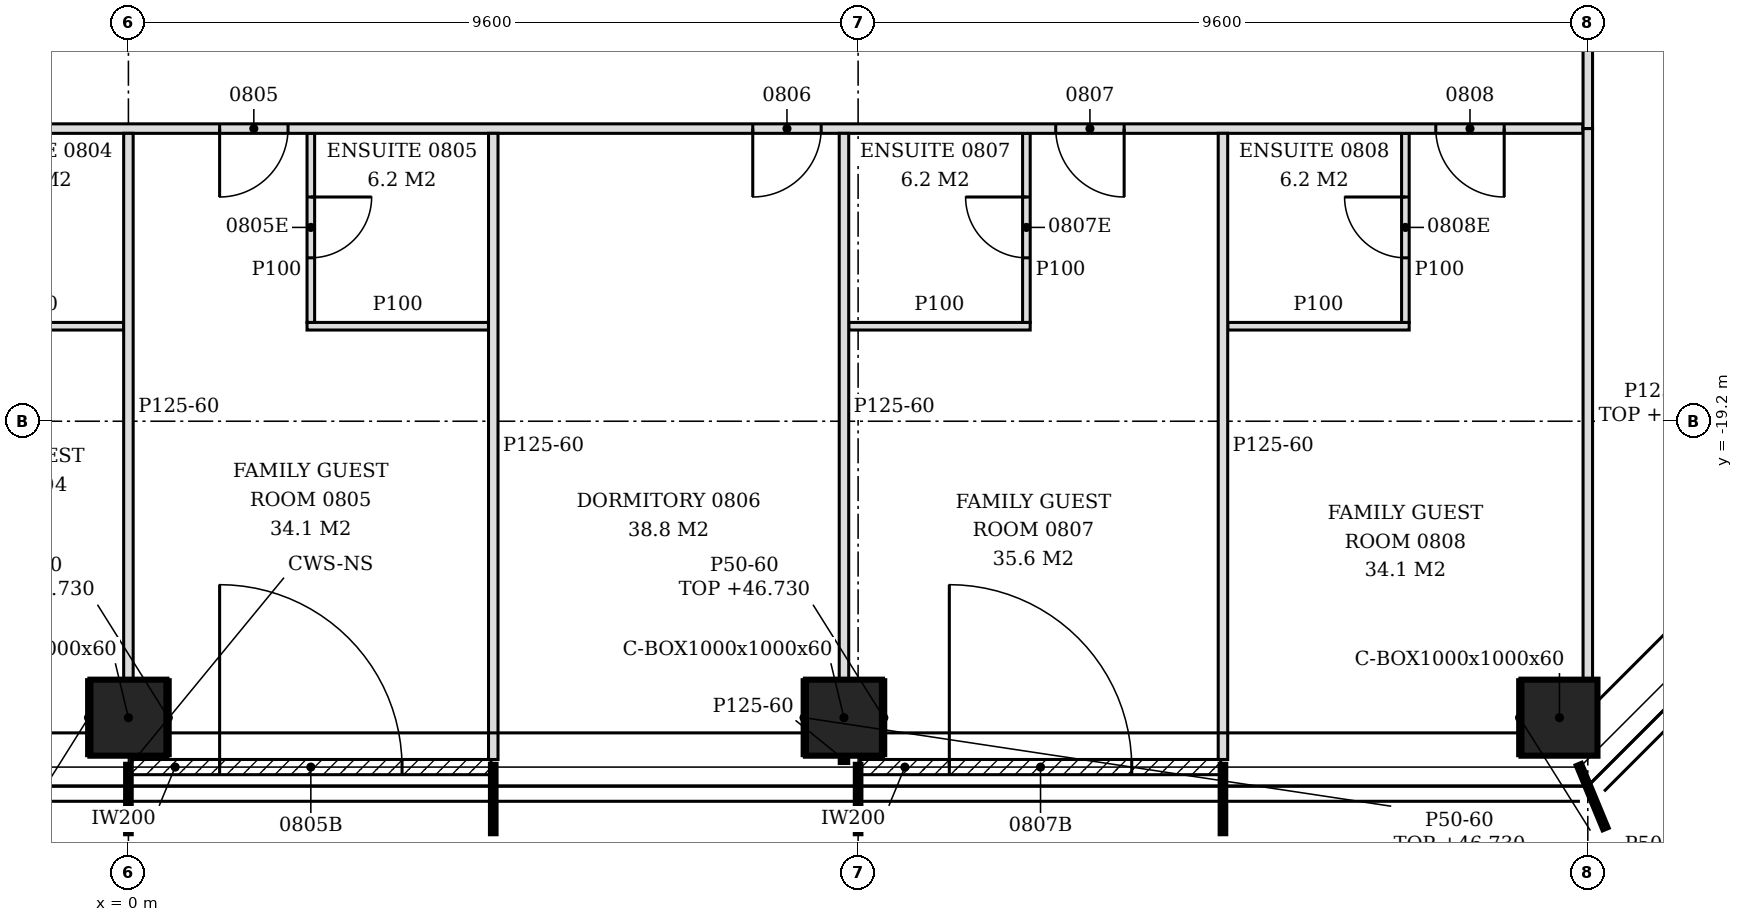
"""IFC4 building model, lengths in metres.
Left out: names, types, materials, properties, quantities, classifications, styles, units other than length and angle.
Written with IfcOpenShell. Run it as: python <this file> out.ifc"""

import sys

from ifc_helpers import new_model, si_unit, direction, frame, frame_2d, origin, origin_2d, place, context, subcontext, project, spatial, polyline, rectangle, hollow_rectangle, outline, extrude, element, fill, save


model = new_model("IFC4")
c1 = context("Model", 3, precision=1e-05, world=origin(), true_north=direction((0.0, 1.0)))
c2 = subcontext(c1, "Body", "Model", "MODEL_VIEW")
j1 = project(units=[si_unit("LENGTHUNIT", "METRE"), si_unit("PLANEANGLEUNIT", "RADIAN")], contexts=[c1])
p1 = place(None, origin())
s1 = spatial("IfcSite", under=j1, at=p1, CompositionType="ELEMENT")
p2 = place(p1, origin())
s2 = spatial("IfcBuilding", under=s1, at=p2, CompositionType="ELEMENT")
p3 = place(p2, frame((0.0, 0.0, 43.8)))
s3 = spatial("IfcBuildingStorey", under=s2, at=p3, CompositionType="ELEMENT", Elevation=43.8)
for number, where, z_axis, x_axis in (
    (1, (0.0, -23.1, -0.15), (0.0, 0.0, 1.0), (1.0, 0.0, 0.0)),
    (2, (9.414, -23.1, -0.15), (0.0, 0.0, 1.0), (1.0, 0.0, 0.0)),
    (3, (18.827, -23.1, -0.15), (0.0, 0.0, 1.0), (1.0, 0.0, 0.0)),
):
    element("IfcColumn", number, at=place(p3, frame(where, z_axis=z_axis, x_axis=x_axis)), inside=s3, PredefinedType="COLUMN", context=c2, shape_type="SweptSolid", body=[
        extrude(hollow_rectangle(XDim=1.0, YDim=1.0, WallThickness=0.06, at=origin_2d()), origin(), (0.0, 0.0, 1.0), 3.6),
    ])
p4 = place(p3, frame((0.03, -23.75, 0.0), z_axis=(0.0, 0.0, 1.0), x_axis=(1.0, 0.0, 0.0)))
e4 = element("IfcWall", 4, at=p4, inside=s3, PredefinedType="NOTDEFINED", context=c2, shape_type="SweptSolid", body=[
    extrude(rectangle(XDim=4.74, YDim=0.2, at=frame_2d((2.37, 0.0))), origin(), (0.0, 0.0, 1.0), 3.45),
])
p5 = place(p4, frame((1.17, 0.0, 0.0)))
e5 = element("IfcOpeningElement", 5, at=p5, cuts=e4, PredefinedType="OPENING", context=c2, shape_type="SweptSolid", body=[
    extrude(rectangle(XDim=2.4, YDim=2.4, at=frame_2d((1.2, 1.2))), frame((0.0, 0.11, 0.0), z_axis=(0.0, -1.0, 0.0), x_axis=(1.0, 0.0, 0.0)), (0.0, 0.0, 1.0), 0.22),
])
p6 = place(p3, frame((9.63, -23.75, 0.0), z_axis=(0.0, 0.0, 1.0), x_axis=(1.0, 0.0, 0.0)))
e6 = element("IfcWall", 6, at=p6, inside=s3, PredefinedType="NOTDEFINED", context=c2, shape_type="SweptSolid", body=[
    extrude(rectangle(XDim=4.74, YDim=0.2, at=frame_2d((2.37, 0.0))), origin(), (0.0, 0.0, 1.0), 3.45),
])
p7 = place(p6, frame((1.17, 0.0, 0.0)))
e7 = element("IfcOpeningElement", 7, at=p7, cuts=e6, PredefinedType="OPENING", context=c2, shape_type="SweptSolid", body=[
    extrude(rectangle(XDim=2.4, YDim=2.4, at=frame_2d((1.2, 1.2))), frame((0.0, 0.11, 0.0), z_axis=(0.0, -1.0, 0.0), x_axis=(1.0, 0.0, 0.0)), (0.0, 0.0, 1.0), 0.22),
])
p8 = place(p3, frame((4.8, -23.65, 0.0), z_axis=(0.0, 0.0, 1.0), x_axis=(0.0, 1.0, 0.0)))
e8 = element("IfcWall", 8, at=p8, inside=s3, PredefinedType="PARTITIONING", context=c2, shape_type="SweptSolid", body=[
    extrude(outline(polyline([(0.0, 0.0), (8.237, 0.0), (8.238, 3.45), (4.555, 3.45), (4.553, 2.88), (4.345, 2.88), (4.343, 3.45), (0.7, 3.45), (0.698, 2.93), (0.4, 2.93), (0.398, 3.45), (0.0, 3.45), (0.0, 0.0)])), frame((0.0, 0.062, 0.0), z_axis=(0.0, -1.0, 0.0), x_axis=(1.0, 0.0, 0.0)), (0.0, 0.0, 1.0), 0.125),
])
p9 = place(p3, frame((9.414, -23.703, 0.0), z_axis=(0.0, 0.0, 1.0), x_axis=(0.0, 1.0, 0.0)))
e9 = element("IfcWall", 9, at=p9, inside=s3, PredefinedType="PARTITIONING", context=c2, shape_type="SweptSolid", body=[
    extrude(rectangle(XDim=0.103, YDim=0.125, at=frame_2d((0.051, 0.0))), origin(), (0.0, 0.0, 1.0), 3.45),
])
p10 = place(p3, frame((14.4, -23.65, 0.0), z_axis=(0.0, 0.0, 1.0), x_axis=(0.0, 1.0, 0.0)))
e10 = element("IfcWall", 10, at=p10, inside=s3, PredefinedType="PARTITIONING", context=c2, shape_type="SweptSolid", body=[
    extrude(outline(polyline([(0.0, 0.0), (8.237, 0.0), (8.238, 3.45), (4.555, 3.45), (4.553, 2.88), (4.345, 2.88), (4.343, 3.45), (0.7, 3.45), (0.698, 2.93), (0.4, 2.93), (0.398, 3.45), (0.0, 3.45), (0.0, 0.0)])), frame((0.0, 0.062, 0.0), z_axis=(0.0, -1.0, 0.0), x_axis=(1.0, 0.0, 0.0)), (0.0, 0.0, 1.0), 0.125),
])
for number, where, z_axis, x_axis in (
    (11, (0.0, -22.6, 0.0), (0.0, 0.0, 1.0), (0.0, 1.0, 0.0)),
    (12, (9.414, -22.6, 0.0), (0.0, 0.0, 1.0), (0.0, 1.0, 0.0)),
):
    element("IfcWall", number, at=place(p3, frame(where, z_axis=z_axis, x_axis=x_axis)), inside=s3, PredefinedType="PARTITIONING", context=c2, shape_type="SweptSolid", body=[
        extrude(outline(polyline([(0.0, 0.0), (7.188, 0.0), (7.188, 3.45), (3.505, 3.45), (3.503, 2.88), (3.295, 2.88), (3.293, 3.45), (0.0, 3.45), (0.0, 0.0)])), frame((0.0, 0.062, 0.0), z_axis=(0.0, -1.0, 0.0), x_axis=(1.0, 0.0, 0.0)), (0.0, 0.0, 1.0), 0.125),
    ])
p11 = place(p3, frame((19.2, -22.6, 0.0), z_axis=(0.0, 0.0, 1.0), x_axis=(0.0, 1.0, 0.0)))
e13 = element("IfcWall", 13, at=p11, inside=s3, PredefinedType="PARTITIONING", context=c2, shape_type="SweptSolid", body=[
    extrude(outline(polyline([(0.0, 0.0), (7.25, 0.0), (7.25, 2.73), (0.43, 2.73), (0.428, 2.63), (0.0, 2.63), (0.0, 0.0)])), frame((0.0, 0.062, 0.0), z_axis=(0.0, -1.0, 0.0), x_axis=(1.0, 0.0, 0.0)), (0.0, 0.0, 1.0), 0.125),
])
for number, where, z_axis, x_axis in (
    (14, (-2.45, -17.95, 0.0), (0.0, 0.0, 1.0), (1.0, 0.0, 0.0)),
    (15, (2.35, -17.95, 0.0), (0.0, 0.0, 1.0), (1.0, 0.0, 0.0)),
):
    element("IfcWall", number, at=place(p3, frame(where, z_axis=z_axis, x_axis=x_axis)), inside=s3, PredefinedType="PARTITIONING", context=c2, shape_type="SweptSolid", body=[
        extrude(rectangle(XDim=2.387, YDim=0.1, at=frame_2d((1.194, 0.0))), origin(), (0.0, 0.0, 1.0), 3.45),
    ])
p12 = place(p3, frame((2.4, -17.9, 0.0), z_axis=(0.0, 0.0, 1.0), x_axis=(0.0, 1.0, 0.0)))
e16 = element("IfcWall", 16, at=p12, inside=s3, PredefinedType="PARTITIONING", context=c2, shape_type="SweptSolid", body=[
    extrude(rectangle(XDim=2.487, YDim=0.1, at=frame_2d((1.244, 0.0))), origin(), (0.0, 0.0, 1.0), 3.45),
])
p13 = place(p12, frame((0.85, 0.0, 0.0)))
e17 = element("IfcOpeningElement", 17, at=p13, cuts=e16, PredefinedType="OPENING", context=c2, shape_type="SweptSolid", body=[
    extrude(rectangle(XDim=0.8, YDim=2.1, at=frame_2d((0.4, 1.05))), frame((0.0, 0.06, 0.0), z_axis=(0.0, -1.0, 0.0), x_axis=(1.0, 0.0, 0.0)), (0.0, 0.0, 1.0), 0.12),
])
p14 = place(p3, frame((9.477, -17.95, 0.0), z_axis=(0.0, 0.0, 1.0), x_axis=(1.0, 0.0, 0.0)))
e18 = element("IfcWall", 18, at=p14, inside=s3, PredefinedType="PARTITIONING", context=c2, shape_type="SweptSolid", body=[
    extrude(rectangle(XDim=2.387, YDim=0.1, at=frame_2d((1.194, 0.0))), origin(), (0.0, 0.0, 1.0), 3.45),
])
p15 = place(p3, frame((11.814, -17.9, 0.0), z_axis=(0.0, 0.0, 1.0), x_axis=(0.0, 1.0, 0.0)))
e19 = element("IfcWall", 19, at=p15, inside=s3, PredefinedType="PARTITIONING", context=c2, shape_type="SweptSolid", body=[
    extrude(rectangle(XDim=2.487, YDim=0.1, at=frame_2d((1.244, 0.0))), origin(), (0.0, 0.0, 1.0), 3.45),
])
p16 = place(p15, frame((0.85, 0.0, 0.0)))
e20 = element("IfcOpeningElement", 20, at=p16, cuts=e19, PredefinedType="OPENING", context=c2, shape_type="SweptSolid", body=[
    extrude(rectangle(XDim=0.8, YDim=2.1, at=frame_2d((0.4, 1.05))), frame((0.0, 0.06, 0.0), z_axis=(0.0, -1.0, 0.0), x_axis=(1.0, 0.0, 0.0)), (0.0, 0.0, 1.0), 0.12),
])
p17 = place(p3, frame((14.462, -17.95, 0.0), z_axis=(0.0, 0.0, 1.0), x_axis=(1.0, 0.0, 0.0)))
e21 = element("IfcWall", 21, at=p17, inside=s3, PredefinedType="PARTITIONING", context=c2, shape_type="SweptSolid", body=[
    extrude(rectangle(XDim=2.388, YDim=0.1, at=frame_2d((1.194, 0.0))), origin(), (0.0, 0.0, 1.0), 3.45),
])
p18 = place(p3, frame((16.8, -17.9, 0.0), z_axis=(0.0, 0.0, 1.0), x_axis=(0.0, 1.0, 0.0)))
e22 = element("IfcWall", 22, at=p18, inside=s3, PredefinedType="PARTITIONING", context=c2, shape_type="SweptSolid", body=[
    extrude(rectangle(XDim=2.487, YDim=0.1, at=frame_2d((1.244, 0.0))), origin(), (0.0, 0.0, 1.0), 3.45),
])
p19 = place(p18, frame((0.85, 0.0, 0.0)))
e23 = element("IfcOpeningElement", 23, at=p19, cuts=e22, PredefinedType="OPENING", context=c2, shape_type="SweptSolid", body=[
    extrude(rectangle(XDim=0.8, YDim=2.1, at=frame_2d((0.4, 1.05))), frame((0.0, 0.06, 0.0), z_axis=(0.0, -1.0, 0.0), x_axis=(1.0, 0.0, 0.0)), (0.0, 0.0, 1.0), 0.12),
])
p20 = place(p3, frame((-20.15, -15.35, 0.0), z_axis=(0.0, 0.0, 1.0), x_axis=(1.0, 0.0, 0.0)))
e24 = element("IfcWall", 24, at=p20, inside=s3, PredefinedType="PARTITIONING", context=c2, shape_type="SweptSolid", body=[
    extrude(outline(polyline([(0.0, 0.0), (39.287, 0.0), (39.288, 2.73), (39.2, 2.73), (39.198, 3.45), (27.5, 3.45), (27.498, 2.73), (27.2, 2.73), (27.198, 3.45), (15.5, 3.45), (15.498, 2.73), (15.2, 2.73), (15.198, 3.45), (5.9, 3.45), (5.898, 2.93), (5.6, 2.93), (5.598, 3.45), (0.0, 3.45), (0.0, 0.0)])), frame((0.0, 0.062, 0.0), z_axis=(0.0, -1.0, 0.0), x_axis=(1.0, 0.0, 0.0)), (0.0, 0.0, 1.0), 0.125),
])
p21 = place(p20, frame((4.55, 0.0, 0.0)))
e25 = element("IfcOpeningElement", 25, at=p21, cuts=e24, PredefinedType="OPENING", context=c2, shape_type="SweptSolid", body=[
    extrude(rectangle(XDim=0.9, YDim=2.1, at=frame_2d((0.45, 1.05))), frame((0.0, 0.073, 0.0), z_axis=(0.0, -1.0, 0.0), x_axis=(1.0, 0.0, 0.0)), (0.0, 0.0, 1.0), 0.145),
])
p22 = place(p20, frame((7.136, 0.0, 0.0)))
e26 = element("IfcOpeningElement", 26, at=p22, cuts=e24, PredefinedType="OPENING", context=c2, shape_type="SweptSolid", body=[
    extrude(rectangle(XDim=0.9, YDim=2.1, at=frame_2d((0.45, 1.05))), frame((0.0, 0.073, 0.0), z_axis=(0.0, -1.0, 0.0), x_axis=(1.0, 0.0, 0.0)), (0.0, 0.0, 1.0), 0.145),
])
p23 = place(p20, frame((14.15, 0.0, 0.0)))
e27 = element("IfcOpeningElement", 27, at=p23, cuts=e24, PredefinedType="OPENING", context=c2, shape_type="SweptSolid", body=[
    extrude(rectangle(XDim=0.9, YDim=2.1, at=frame_2d((0.45, 1.05))), frame((0.0, 0.073, 0.0), z_axis=(0.0, -1.0, 0.0), x_axis=(1.0, 0.0, 0.0)), (0.0, 0.0, 1.0), 0.145),
])
p24 = place(p20, frame((16.55, 0.0, 0.0)))
e28 = element("IfcOpeningElement", 28, at=p24, cuts=e24, PredefinedType="OPENING", context=c2, shape_type="SweptSolid", body=[
    extrude(rectangle(XDim=0.9, YDim=2.1, at=frame_2d((0.45, 1.05))), frame((0.0, 0.073, 0.0), z_axis=(0.0, -1.0, 0.0), x_axis=(1.0, 0.0, 0.0)), (0.0, 0.0, 1.0), 0.145),
])
p25 = place(p20, frame((21.35, 0.0, 0.0)))
e29 = element("IfcOpeningElement", 29, at=p25, cuts=e24, PredefinedType="OPENING", context=c2, shape_type="SweptSolid", body=[
    extrude(rectangle(XDim=0.9, YDim=2.1, at=frame_2d((0.45, 1.05))), frame((0.0, 0.073, 0.0), z_axis=(0.0, -1.0, 0.0), x_axis=(1.0, 0.0, 0.0)), (0.0, 0.0, 1.0), 0.145),
])
p26 = place(p20, frame((28.364, 0.0, 0.0)))
e30 = element("IfcOpeningElement", 30, at=p26, cuts=e24, PredefinedType="OPENING", context=c2, shape_type="SweptSolid", body=[
    extrude(rectangle(XDim=0.9, YDim=2.1, at=frame_2d((0.45, 1.05))), frame((0.0, 0.073, 0.0), z_axis=(0.0, -1.0, 0.0), x_axis=(1.0, 0.0, 0.0)), (0.0, 0.0, 1.0), 0.145),
])
p27 = place(p20, frame((32.35, 0.0, 0.0)))
e31 = element("IfcOpeningElement", 31, at=p27, cuts=e24, PredefinedType="OPENING", context=c2, shape_type="SweptSolid", body=[
    extrude(rectangle(XDim=0.9, YDim=2.1, at=frame_2d((0.45, 1.05))), frame((0.0, 0.073, 0.0), z_axis=(0.0, -1.0, 0.0), x_axis=(1.0, 0.0, 0.0)), (0.0, 0.0, 1.0), 0.145),
])
p28 = place(p20, frame((37.35, 0.0, 0.0)))
e32 = element("IfcOpeningElement", 32, at=p28, cuts=e24, PredefinedType="OPENING", context=c2, shape_type="SweptSolid", body=[
    extrude(rectangle(XDim=0.9, YDim=2.1, at=frame_2d((0.45, 1.05))), frame((0.0, 0.073, 0.0), z_axis=(0.0, -1.0, 0.0), x_axis=(1.0, 0.0, 0.0)), (0.0, 0.0, 1.0), 0.145),
])
p29 = place(p3, frame((19.2, -15.35, 0.0), z_axis=(0.0, 0.0, 1.0), x_axis=(0.0, 1.0, 0.0)))
e33 = element("IfcWall", 33, at=p29, inside=s3, PredefinedType="PARTITIONING", context=c2, shape_type="SweptSolid", body=[
    extrude(rectangle(XDim=6.713, YDim=0.125, at=frame_2d((3.356, 0.0))), origin(), (0.0, 0.0, 1.0), 2.73),
])
p30 = place(p29, frame((4.55, 0.0, 0.0)))
e34 = element("IfcOpeningElement", 34, at=p30, cuts=e33, PredefinedType="OPENING", context=c2, shape_type="SweptSolid", body=[
    extrude(rectangle(XDim=0.9, YDim=2.1, at=frame_2d((0.45, 1.05))), frame((0.0, 0.073, 0.0), z_axis=(0.0, -1.0, 0.0), x_axis=(1.0, 0.0, 0.0)), (0.0, 0.0, 1.0), 0.145),
])
for number, where, z_axis, x_axis in (
    (35, (-0.525, -23.6, 0.0), (0.0, 0.0, 1.0), (0.0, 1.0, 0.0)),
    (36, (0.525, -23.6, 0.0), (0.0, 0.0, 1.0), (0.0, 1.0, 0.0)),
    (37, (8.889, -23.6, 0.0), (0.0, 0.0, 1.0), (0.0, 1.0, 0.0)),
    (38, (9.939, -23.6, 0.0), (0.0, 0.0, 1.0), (0.0, 1.0, 0.0)),
    (39, (18.302, -23.6, 0.0), (0.0, 0.0, 1.0), (0.0, 1.0, 0.0)),
):
    element("IfcWall", number, at=place(p3, frame(where, z_axis=z_axis, x_axis=x_axis)), inside=s3, PredefinedType="PARTITIONING", context=c2, shape_type="SweptSolid", body=[
        extrude(rectangle(XDim=1.0, YDim=0.05, at=frame_2d((0.5, 0.0))), origin(), (0.0, 0.0, 1.0), 2.93),
    ])
p31 = place(p5, origin())
e40 = element("IfcDoor", 40, at=p31, inside=s3, OperationType="SINGLE_SWING_LEFT", PredefinedType="DOOR", context=c2, shape_type="SweptSolid", body=[
    extrude(rectangle(XDim=2.4, YDim=2.4, at=frame_2d((1.2, 1.2))), frame((0.0, 0.025, 0.0), z_axis=(0.0, -1.0, 0.0), x_axis=(1.0, 0.0, 0.0)), (0.0, 0.0, 1.0), 0.05),
])
fill(e5, e40)
p32 = place(p7, origin())
e41 = element("IfcDoor", 41, at=p32, inside=s3, OperationType="SINGLE_SWING_LEFT", PredefinedType="DOOR", context=c2, shape_type="SweptSolid", body=[
    extrude(rectangle(XDim=2.4, YDim=2.4, at=frame_2d((1.2, 1.2))), frame((0.0, 0.025, 0.0), z_axis=(0.0, -1.0, 0.0), x_axis=(1.0, 0.0, 0.0)), (0.0, 0.0, 1.0), 0.05),
])
fill(e7, e41)
p33 = place(p25, frame((0.9, 0.0, 0.0), z_axis=(0.0, 0.0, 1.0), x_axis=(-1.0, 0.0, 0.0)))
e42 = element("IfcDoor", 42, at=p33, inside=s3, OperationType="SINGLE_SWING_RIGHT", PredefinedType="DOOR", context=c2, shape_type="SweptSolid", body=[
    extrude(rectangle(XDim=0.9, YDim=2.1, at=frame_2d((0.45, 1.05))), frame((0.0, 0.025, 0.0), z_axis=(0.0, -1.0, 0.0), x_axis=(1.0, 0.0, 0.0)), (0.0, 0.0, 1.0), 0.05),
])
fill(e29, e42)
p34 = place(p13, frame((0.8, 0.0, 0.0), z_axis=(0.0, 0.0, 1.0), x_axis=(-1.0, 0.0, 0.0)))
e43 = element("IfcDoor", 43, at=p34, inside=s3, OperationType="SINGLE_SWING_LEFT", PredefinedType="DOOR", context=c2, shape_type="SweptSolid", body=[
    extrude(rectangle(XDim=0.8, YDim=2.1, at=frame_2d((0.4, 1.05))), frame((0.0, 0.025, 0.0), z_axis=(0.0, -1.0, 0.0), x_axis=(1.0, 0.0, 0.0)), (0.0, 0.0, 1.0), 0.05),
])
fill(e17, e43)
p35 = place(p26, frame((0.9, 0.0, 0.0), z_axis=(0.0, 0.0, 1.0), x_axis=(-1.0, 0.0, 0.0)))
e44 = element("IfcDoor", 44, at=p35, inside=s3, OperationType="SINGLE_SWING_RIGHT", PredefinedType="DOOR", context=c2, shape_type="SweptSolid", body=[
    extrude(rectangle(XDim=0.9, YDim=2.1, at=frame_2d((0.45, 1.05))), frame((0.0, 0.025, 0.0), z_axis=(0.0, -1.0, 0.0), x_axis=(1.0, 0.0, 0.0)), (0.0, 0.0, 1.0), 0.05),
])
fill(e30, e44)
p36 = place(p27, frame((0.9, 0.0, 0.0), z_axis=(0.0, 0.0, 1.0), x_axis=(-1.0, 0.0, 0.0)))
e45 = element("IfcDoor", 45, at=p36, inside=s3, OperationType="SINGLE_SWING_LEFT", PredefinedType="DOOR", context=c2, shape_type="SweptSolid", body=[
    extrude(rectangle(XDim=0.9, YDim=2.1, at=frame_2d((0.45, 1.05))), frame((0.0, 0.025, 0.0), z_axis=(0.0, -1.0, 0.0), x_axis=(1.0, 0.0, 0.0)), (0.0, 0.0, 1.0), 0.05),
])
fill(e31, e45)
p37 = place(p16, origin())
e46 = element("IfcDoor", 46, at=p37, inside=s3, OperationType="SINGLE_SWING_RIGHT", PredefinedType="DOOR", context=c2, shape_type="SweptSolid", body=[
    extrude(rectangle(XDim=0.8, YDim=2.1, at=frame_2d((0.4, 1.05))), frame((0.0, 0.025, 0.0), z_axis=(0.0, -1.0, 0.0), x_axis=(1.0, 0.0, 0.0)), (0.0, 0.0, 1.0), 0.05),
])
fill(e20, e46)
p38 = place(p28, frame((0.9, 0.0, 0.0), z_axis=(0.0, 0.0, 1.0), x_axis=(-1.0, 0.0, 0.0)))
e47 = element("IfcDoor", 47, at=p38, inside=s3, OperationType="SINGLE_SWING_LEFT", PredefinedType="DOOR", context=c2, shape_type="SweptSolid", body=[
    extrude(rectangle(XDim=0.9, YDim=2.1, at=frame_2d((0.45, 1.05))), frame((0.0, 0.025, 0.0), z_axis=(0.0, -1.0, 0.0), x_axis=(1.0, 0.0, 0.0)), (0.0, 0.0, 1.0), 0.05),
])
fill(e32, e47)
p39 = place(p19, origin())
e48 = element("IfcDoor", 48, at=p39, inside=s3, OperationType="SINGLE_SWING_RIGHT", PredefinedType="DOOR", context=c2, shape_type="SweptSolid", body=[
    extrude(rectangle(XDim=0.8, YDim=2.1, at=frame_2d((0.4, 1.05))), frame((0.0, 0.025, 0.0), z_axis=(0.0, -1.0, 0.0), x_axis=(1.0, 0.0, 0.0)), (0.0, 0.0, 1.0), 0.05),
])
fill(e23, e48)
save(model, sys.argv[1])
